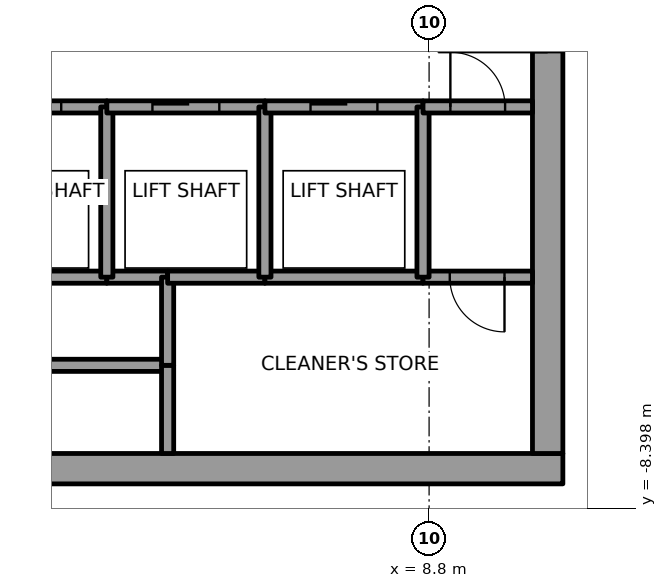
"""IFC4 building model, lengths in metres.
Left out: names, types, materials, properties, quantities, classifications, styles, units other than length and angle.
Written with IfcOpenShell. Run it as: python <this file> out.ifc"""

import sys

from ifc_helpers import new_model, si_unit, direction, frame, frame_2d, origin, place, context, subcontext, project, spatial, rectangle, extrude, element, fill, save


model = new_model("IFC4")
c1 = context("Model", 3, precision=1e-05, world=origin(), true_north=direction((0.0, 1.0)))
c2 = subcontext(c1, "Body", "Model", "MODEL_VIEW")
j1 = project(units=[si_unit("LENGTHUNIT", "METRE"), si_unit("PLANEANGLEUNIT", "RADIAN")], contexts=[c1])
p1 = place(None, origin())
s1 = spatial("IfcSite", under=j1, at=p1, CompositionType="ELEMENT")
p2 = place(p1, origin())
s2 = spatial("IfcBuilding", under=s1, at=p2, CompositionType="ELEMENT")
p3 = place(p2, frame((0.0, 0.0, 287.0)))
s3 = spatial("IfcBuildingStorey", under=s2, at=p3, CompositionType="ELEMENT", Elevation=287.0)
p4 = place(p3, frame((-11.0, -7.75, 0.0), z_axis=(0.0, 0.0, 1.0), x_axis=(1.0, 0.0, 0.0)))
e1 = element("IfcWall", 1, at=p4, inside=s3, PredefinedType="SHEAR", context=c2, shape_type="SweptSolid", body=[
    extrude(rectangle(XDim=22.0, YDim=0.5, at=frame_2d((11.0, 0.0))), origin(), (0.0, 0.0, 1.0), 4.0),
])
p5 = place(p4, frame((10.45, 0.0, 0.0)))
e2 = element("IfcOpeningElement", 2, at=p5, cuts=e1, PredefinedType="OPENING", context=c2, shape_type="SweptSolid", body=[
    extrude(rectangle(XDim=1.1, YDim=2.1, at=frame_2d((0.55, 1.05))), frame((0.0, 0.25, 0.0), z_axis=(0.0, -1.0, 0.0), x_axis=(1.0, 0.0, 0.0)), (0.0, 0.0, 1.0), 0.5),
])
p6 = place(p3, frame((10.75, -7.5, 0.0), z_axis=(0.0, 0.0, 1.0), x_axis=(0.0, 1.0, 0.0)))
e3 = element("IfcWall", 3, at=p6, inside=s3, PredefinedType="SHEAR", context=c2, shape_type="SweptSolid", body=[
    extrude(rectangle(XDim=15.0, YDim=0.5, at=frame_2d((7.5, 0.0))), origin(), (0.0, 0.0, 1.0), 4.0),
])
p7 = place(p6, frame((6.6, 0.0, 0.0)))
e4 = element("IfcOpeningElement", 4, at=p7, cuts=e3, PredefinedType="OPENING", context=c2, shape_type="SweptSolid", body=[
    extrude(rectangle(XDim=1.8, YDim=2.1, at=frame_2d((0.9, 1.05))), frame((0.0, 0.25, 0.0), z_axis=(0.0, -1.0, 0.0), x_axis=(1.0, 0.0, 0.0)), (0.0, 0.0, 1.0), 0.5),
])
p8 = place(p3, frame((0.9, -1.8, 0.0), z_axis=(0.0, 0.0, 1.0), x_axis=(1.0, 0.0, 0.0)))
e5 = element("IfcWall", 5, at=p8, inside=s3, PredefinedType="SOLIDWALL", context=c2, shape_type="SweptSolid", body=[
    extrude(rectangle(XDim=2.6, YDim=0.2, at=frame_2d((1.3, 0.0))), origin(), (0.0, 0.0, 1.0), 3.85),
])
p9 = place(p8, frame((0.75, 0.0, 0.0)))
e6 = element("IfcOpeningElement", 6, at=p9, cuts=e5, PredefinedType="OPENING", context=c2, shape_type="SweptSolid", body=[
    extrude(rectangle(XDim=1.1, YDim=2.1, at=frame_2d((0.55, 1.05))), frame((0.0, 0.1, 0.0), z_axis=(0.0, -1.0, 0.0), x_axis=(1.0, 0.0, 0.0)), (0.0, 0.0, 1.0), 0.2),
])
p10 = place(p3, frame((4.5, -6.05, 0.0), z_axis=(0.0, 0.0, 1.0), x_axis=(-1.0, 0.0, 0.0)))
e7 = element("IfcWall", 7, at=p10, inside=s3, PredefinedType="SOLIDWALL", context=c2, shape_type="SweptSolid", body=[
    extrude(rectangle(XDim=2.9, YDim=0.2, at=frame_2d((1.45, 0.0))), origin(), (0.0, 0.0, 1.0), 3.85),
])
p11 = place(p3, frame((3.5, -4.6, 0.0), z_axis=(0.0, 0.0, 1.0), x_axis=(-1.0, 0.0, 0.0)))
e8 = element("IfcWall", 8, at=p11, inside=s3, PredefinedType="SOLIDWALL", context=c2, shape_type="SweptSolid", body=[
    extrude(rectangle(XDim=1.9, YDim=0.2, at=frame_2d((0.95, 0.0))), origin(), (0.0, 0.0, 1.0), 3.85),
])
p12 = place(p3, frame((4.5, -4.6, 0.0), z_axis=(0.0, 0.0, 1.0), x_axis=(-1.0, 0.0, 0.0)))
e9 = element("IfcWall", 9, at=p12, inside=s3, PredefinedType="SOLIDWALL", context=c2, shape_type="SweptSolid", body=[
    extrude(rectangle(XDim=1.0, YDim=0.2, at=frame_2d((0.5, 0.0))), origin(), (0.0, 0.0, 1.0), 3.85),
])
p13 = place(p3, frame((3.5, -4.6, 0.0), z_axis=(0.0, 0.0, 1.0), x_axis=(0.0, 1.0, 0.0)))
e10 = element("IfcWall", 10, at=p13, inside=s3, PredefinedType="SOLIDWALL", context=c2, shape_type="SweptSolid", body=[
    extrude(rectangle(XDim=2.8, YDim=0.2, at=frame_2d((1.4, 0.0))), origin(), (0.0, 0.0, 1.0), 3.85),
])
p14 = place(p3, frame((3.5, -1.8, 0.0), z_axis=(0.0, 0.0, 1.0), x_axis=(1.0, 0.0, 0.0)))
e11 = element("IfcWall", 11, at=p14, inside=s3, PredefinedType="SOLIDWALL", context=c2, shape_type="SweptSolid", body=[
    extrude(rectangle(XDim=2.6, YDim=0.2, at=frame_2d((1.3, 0.0))), origin(), (0.0, 0.0, 1.0), 3.85),
])
p15 = place(p14, frame((0.75, 0.0, 0.0)))
e12 = element("IfcOpeningElement", 12, at=p15, cuts=e11, PredefinedType="OPENING", context=c2, shape_type="SweptSolid", body=[
    extrude(rectangle(XDim=1.1, YDim=2.1, at=frame_2d((0.55, 1.05))), frame((0.0, 0.1, 0.0), z_axis=(0.0, -1.0, 0.0), x_axis=(1.0, 0.0, 0.0)), (0.0, 0.0, 1.0), 0.2),
])
for number, where, z_axis, x_axis in (
    (13, (4.5, -6.05, 0.0), (0.0, 0.0, 1.0), (0.0, -1.0, 0.0)),
    (14, (4.5, -4.6, 0.0), (0.0, 0.0, 1.0), (0.0, -1.0, 0.0)),
):
    element("IfcWall", number, at=place(p3, frame(where, z_axis=z_axis, x_axis=x_axis)), inside=s3, PredefinedType="SOLIDWALL", context=c2, shape_type="SweptSolid", body=[
        extrude(rectangle(XDim=1.45, YDim=0.2, at=frame_2d((0.725, 0.0))), origin(), (0.0, 0.0, 1.0), 3.85),
    ])
p16 = place(p3, frame((6.1, -4.6, 0.0), z_axis=(0.0, 0.0, 1.0), x_axis=(-1.0, 0.0, 0.0)))
e15 = element("IfcWall", 15, at=p16, inside=s3, PredefinedType="SOLIDWALL", context=c2, shape_type="SweptSolid", body=[
    extrude(rectangle(XDim=1.6, YDim=0.2, at=frame_2d((0.8, 0.0))), origin(), (0.0, 0.0, 1.0), 3.85),
])
p17 = place(p3, frame((8.7, -4.6, 0.0), z_axis=(0.0, 0.0, 1.0), x_axis=(-1.0, 0.0, 0.0)))
e16 = element("IfcWall", 16, at=p17, inside=s3, PredefinedType="SOLIDWALL", context=c2, shape_type="SweptSolid", body=[
    extrude(rectangle(XDim=2.6, YDim=0.2, at=frame_2d((1.3, 0.0))), origin(), (0.0, 0.0, 1.0), 3.85),
])
p18 = place(p3, frame((6.1, -4.6, 0.0), z_axis=(0.0, 0.0, 1.0), x_axis=(0.0, 1.0, 0.0)))
e17 = element("IfcWall", 17, at=p18, inside=s3, PredefinedType="SOLIDWALL", context=c2, shape_type="SweptSolid", body=[
    extrude(rectangle(XDim=2.8, YDim=0.2, at=frame_2d((1.4, 0.0))), origin(), (0.0, 0.0, 1.0), 3.85),
])
p19 = place(p3, frame((6.1, -1.8, 0.0), z_axis=(0.0, 0.0, 1.0), x_axis=(1.0, 0.0, 0.0)))
e18 = element("IfcWall", 18, at=p19, inside=s3, PredefinedType="SOLIDWALL", context=c2, shape_type="SweptSolid", body=[
    extrude(rectangle(XDim=2.6, YDim=0.2, at=frame_2d((1.3, 0.0))), origin(), (0.0, 0.0, 1.0), 3.85),
])
p20 = place(p19, frame((0.75, 0.0, 0.0)))
e19 = element("IfcOpeningElement", 19, at=p20, cuts=e18, PredefinedType="OPENING", context=c2, shape_type="SweptSolid", body=[
    extrude(rectangle(XDim=1.1, YDim=2.1, at=frame_2d((0.55, 1.05))), frame((0.0, 0.1, 0.0), z_axis=(0.0, -1.0, 0.0), x_axis=(1.0, 0.0, 0.0)), (0.0, 0.0, 1.0), 0.2),
])
p21 = place(p3, frame((10.5, -4.6, 0.0), z_axis=(0.0, 0.0, 1.0), x_axis=(-1.0, 0.0, 0.0)))
e20 = element("IfcWall", 20, at=p21, inside=s3, PredefinedType="SOLIDWALL", context=c2, shape_type="SweptSolid", body=[
    extrude(rectangle(XDim=1.8, YDim=0.2, at=frame_2d((0.9, 0.0))), origin(), (0.0, 0.0, 1.0), 3.85),
])
p22 = place(p21, frame((0.46, 0.0, 0.0)))
e21 = element("IfcOpeningElement", 21, at=p22, cuts=e20, PredefinedType="OPENING", context=c2, shape_type="SweptSolid", body=[
    extrude(rectangle(XDim=0.9, YDim=2.1, at=frame_2d((0.45, 1.05))), frame((0.0, 0.1, 0.0), z_axis=(0.0, -1.0, 0.0), x_axis=(1.0, 0.0, 0.0)), (0.0, 0.0, 1.0), 0.2),
])
p23 = place(p3, frame((8.7, -1.8, 0.0), z_axis=(0.0, 0.0, 1.0), x_axis=(0.0, -1.0, 0.0)))
e22 = element("IfcWall", 22, at=p23, inside=s3, PredefinedType="SOLIDWALL", context=c2, shape_type="SweptSolid", body=[
    extrude(rectangle(XDim=2.8, YDim=0.2, at=frame_2d((1.4, 0.0))), origin(), (0.0, 0.0, 1.0), 3.85),
])
p24 = place(p3, frame((8.7, -1.8, 0.0), z_axis=(0.0, 0.0, 1.0), x_axis=(1.0, 0.0, 0.0)))
e23 = element("IfcWall", 23, at=p24, inside=s3, PredefinedType="SOLIDWALL", context=c2, shape_type="SweptSolid", body=[
    extrude(rectangle(XDim=1.8, YDim=0.2, at=frame_2d((0.9, 0.0))), origin(), (0.0, 0.0, 1.0), 3.85),
])
p25 = place(p24, frame((0.45, 0.0, 0.0)))
e24 = element("IfcOpeningElement", 24, at=p25, cuts=e23, PredefinedType="OPENING", context=c2, shape_type="SweptSolid", body=[
    extrude(rectangle(XDim=0.9, YDim=2.1, at=frame_2d((0.45, 1.05))), frame((0.0, 0.1, 0.0), z_axis=(0.0, -1.0, 0.0), x_axis=(1.0, 0.0, 0.0)), (0.0, 0.0, 1.0), 0.2),
])
p26 = place(p9, origin())
e25 = element("IfcDoor", 25, at=p26, inside=s3, OperationType="SLIDING_TO_RIGHT", PredefinedType="DOOR", context=c2, shape_type="SweptSolid", body=[
    extrude(rectangle(XDim=1.1, YDim=2.1, at=frame_2d((0.55, 1.05))), frame((0.0, 0.025, 0.0), z_axis=(0.0, -1.0, 0.0), x_axis=(1.0, 0.0, 0.0)), (0.0, 0.0, 1.0), 0.05),
])
fill(e6, e25)
p27 = place(p15, origin())
e26 = element("IfcDoor", 26, at=p27, inside=s3, OperationType="SLIDING_TO_RIGHT", PredefinedType="DOOR", context=c2, shape_type="SweptSolid", body=[
    extrude(rectangle(XDim=1.1, YDim=2.1, at=frame_2d((0.55, 1.05))), frame((0.0, 0.025, 0.0), z_axis=(0.0, -1.0, 0.0), x_axis=(1.0, 0.0, 0.0)), (0.0, 0.0, 1.0), 0.05),
])
fill(e12, e26)
p28 = place(p20, origin())
e27 = element("IfcDoor", 27, at=p28, inside=s3, OperationType="SLIDING_TO_LEFT", PredefinedType="DOOR", context=c2, shape_type="SweptSolid", body=[
    extrude(rectangle(XDim=1.1, YDim=2.1, at=frame_2d((0.55, 1.05))), frame((0.0, 0.025, 0.0), z_axis=(0.0, -1.0, 0.0), x_axis=(1.0, 0.0, 0.0)), (0.0, 0.0, 1.0), 0.05),
])
fill(e19, e27)
p29 = place(p22, origin())
e28 = element("IfcDoor", 28, at=p29, inside=s3, OperationType="SINGLE_SWING_RIGHT", PredefinedType="DOOR", context=c2, shape_type="SweptSolid", body=[
    extrude(rectangle(XDim=0.9, YDim=2.1, at=frame_2d((0.45, 1.05))), frame((0.0, 0.025, 0.0), z_axis=(0.0, -1.0, 0.0), x_axis=(1.0, 0.0, 0.0)), (0.0, 0.0, 1.0), 0.05),
])
fill(e21, e28)
p30 = place(p25, origin())
e29 = element("IfcDoor", 29, at=p30, inside=s3, OperationType="SINGLE_SWING_LEFT", PredefinedType="DOOR", context=c2, shape_type="SweptSolid", body=[
    extrude(rectangle(XDim=0.9, YDim=2.1, at=frame_2d((0.45, 1.05))), frame((0.0, 0.025, 0.0), z_axis=(0.0, -1.0, 0.0), x_axis=(1.0, 0.0, 0.0)), (0.0, 0.0, 1.0), 0.05),
])
fill(e24, e29)
p31 = place(p7, origin())
e30 = element("IfcDoor", 30, at=p31, inside=s3, OperationType="DOUBLE_DOOR_SINGLE_SWING", PredefinedType="DOOR", context=c2, shape_type="SweptSolid", body=[
    extrude(rectangle(XDim=1.8, YDim=2.1, at=frame_2d((0.9, 1.05))), frame((0.0, 0.025, 0.0), z_axis=(0.0, -1.0, 0.0), x_axis=(1.0, 0.0, 0.0)), (0.0, 0.0, 1.0), 0.05),
])
fill(e4, e30)
save(model, sys.argv[1])
